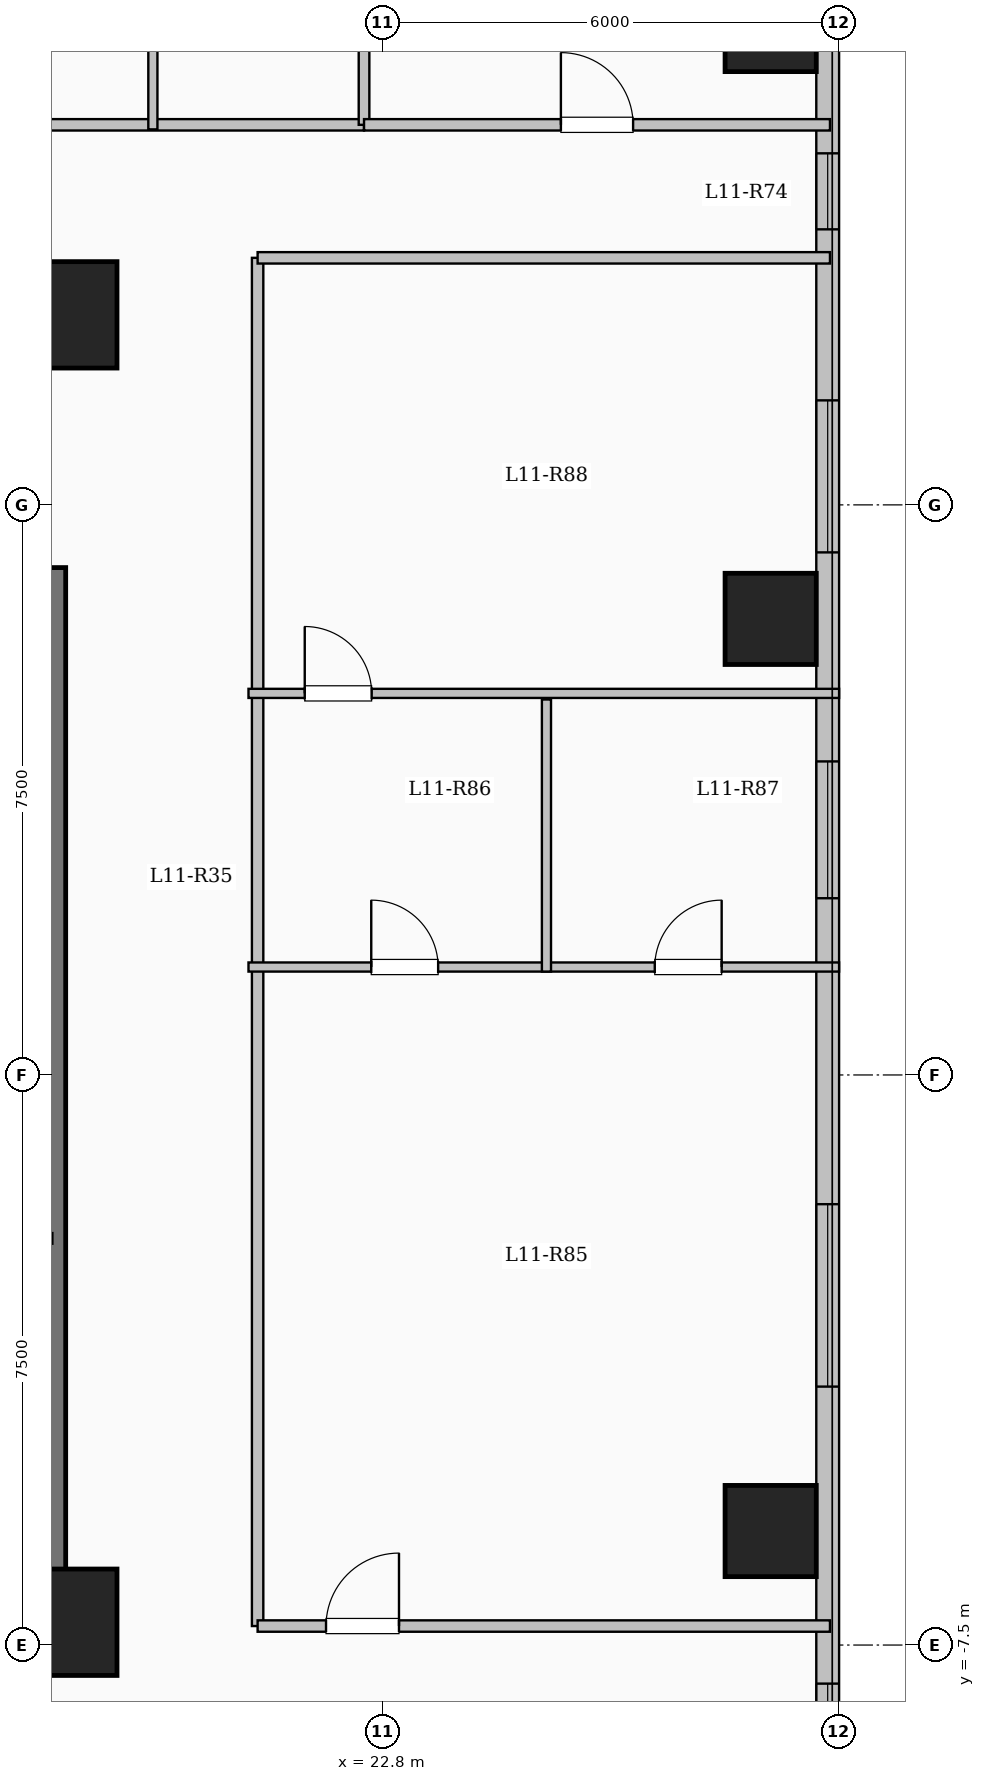
"""IFC4 building model, lengths in metres.
Left out: names, types, materials, properties, quantities, classifications, styles, units other than length and angle.
Written with IfcOpenShell. Run it as: python <this file> out.ifc"""

import sys

from ifc_helpers import new_model, si_unit, direction, frame, frame_2d, origin, origin_2d, place, context, subcontext, project, spatial, rectangle, extrude, element, fill, save


model = new_model("IFC4")
c1 = context("Model", 3, precision=1e-05, world=origin(), true_north=direction((0.0, 1.0)))
c2 = subcontext(c1, "Body", "Model", "MODEL_VIEW")
j1 = project(units=[si_unit("LENGTHUNIT", "METRE"), si_unit("PLANEANGLEUNIT", "RADIAN")], contexts=[c1])
p1 = place(None, origin())
s1 = spatial("IfcSite", under=j1, at=p1, CompositionType="ELEMENT")
p2 = place(p1, origin())
s2 = spatial("IfcBuilding", under=s1, at=p2, CompositionType="ELEMENT")
p3 = place(p2, frame((0.0, 0.0, 44.1)))
s3 = spatial("IfcBuildingStorey", under=s2, at=p3, CompositionType="ELEMENT", Elevation=44.1)
for number, where, z_axis, x_axis in (
    (1, (18.6, -7.2, 0.0), (0.0, 0.0, 1.0), (1.0, 0.0, 0.0)),
    (2, (18.6, 10.0, 0.0), (0.0, 0.0, 1.0), (1.0, 0.0, 0.0)),
):
    element("IfcColumn", number, at=place(p3, frame(where, z_axis=z_axis, x_axis=x_axis)), inside=s3, PredefinedType="COLUMN", context=c2, shape_type="SweptSolid", body=[
        extrude(rectangle(XDim=1.4, YDim=1.4, at=origin_2d()), origin(), (0.0, 0.0, 1.0), 3.35),
    ])
for number, where, z_axis, x_axis in (
    (3, (27.9, -6.0, 0.0), (0.0, 0.0, 1.0), (1.0, 0.0, 0.0)),
    (4, (27.9, 6.0, 0.0), (0.0, 0.0, 1.0), (1.0, 0.0, 0.0)),
    (5, (27.9, 13.8, 0.0), (0.0, 0.0, 1.0), (1.0, 0.0, 0.0)),
):
    element("IfcColumn", number, at=place(p3, frame(where, z_axis=z_axis, x_axis=x_axis)), inside=s3, PredefinedType="COLUMN", context=c2, shape_type="SweptSolid", body=[
        extrude(rectangle(XDim=1.2, YDim=1.2, at=origin_2d()), origin(), (0.0, 0.0, 1.0), 3.35),
    ])
p4 = place(p3, frame((28.65, 19.05, 0.0), z_axis=(0.0, 0.0, 1.0), x_axis=(0.0, -1.0, 0.0)))
e6 = element("IfcWall", 6, at=p4, inside=s3, PredefinedType="SOLIDWALL", context=c2, shape_type="SweptSolid", body=[
    extrude(rectangle(XDim=38.1, YDim=0.3, at=frame_2d((19.05, 0.0))), origin(), (0.0, 0.0, 1.0), 3.1),
])
p5 = place(p4, frame((2.275, 0.0, 0.9)))
e7 = element("IfcOpeningElement", 7, at=p5, cuts=e6, PredefinedType="OPENING", context=c2, shape_type="SweptSolid", body=[
    extrude(rectangle(XDim=2.0, YDim=1.7, at=frame_2d((1.0, 0.85))), frame((0.0, 0.16, 0.0), z_axis=(0.0, -1.0, 0.0), x_axis=(1.0, 0.0, 0.0)), (0.0, 0.0, 1.0), 0.32),
])
p6 = place(p4, frame((6.925, 0.0, 0.95)))
e8 = element("IfcOpeningElement", 8, at=p6, cuts=e6, PredefinedType="OPENING", context=c2, shape_type="SweptSolid", body=[
    extrude(rectangle(XDim=1.0, YDim=1.5, at=frame_2d((0.5, 0.75))), frame((0.0, 0.16, 0.0), z_axis=(0.0, -1.0, 0.0), x_axis=(1.0, 0.0, 0.0)), (0.0, 0.0, 1.0), 0.32),
])
p7 = place(p4, frame((10.175, 0.0, 0.9)))
e9 = element("IfcOpeningElement", 9, at=p7, cuts=e6, PredefinedType="OPENING", context=c2, shape_type="SweptSolid", body=[
    extrude(rectangle(XDim=2.0, YDim=1.7, at=frame_2d((1.0, 0.85))), frame((0.0, 0.16, 0.0), z_axis=(0.0, -1.0, 0.0), x_axis=(1.0, 0.0, 0.0)), (0.0, 0.0, 1.0), 0.32),
])
p8 = place(p4, frame((14.925, 0.0, 0.9)))
e10 = element("IfcOpeningElement", 10, at=p8, cuts=e6, PredefinedType="OPENING", context=c2, shape_type="SweptSolid", body=[
    extrude(rectangle(XDim=1.8, YDim=1.65, at=frame_2d((0.9, 0.825))), frame((0.0, 0.16, 0.0), z_axis=(0.0, -1.0, 0.0), x_axis=(1.0, 0.0, 0.0)), (0.0, 0.0, 1.0), 0.32),
])
p9 = place(p4, frame((20.75, 0.0, 0.9)))
e11 = element("IfcOpeningElement", 11, at=p9, cuts=e6, PredefinedType="OPENING", context=c2, shape_type="SweptSolid", body=[
    extrude(rectangle(XDim=2.4, YDim=1.8, at=frame_2d((1.2, 0.9))), frame((0.0, 0.16, 0.0), z_axis=(0.0, -1.0, 0.0), x_axis=(1.0, 0.0, 0.0)), (0.0, 0.0, 1.0), 0.32),
])
p10 = place(p4, frame((27.058, 0.0, 0.9)))
e12 = element("IfcOpeningElement", 12, at=p10, cuts=e6, PredefinedType="OPENING", context=c2, shape_type="SweptSolid", body=[
    extrude(rectangle(XDim=1.5, YDim=1.65, at=frame_2d((0.75, 0.825))), frame((0.0, 0.16, 0.0), z_axis=(0.0, -1.0, 0.0), x_axis=(1.0, 0.0, 0.0)), (0.0, 0.0, 1.0), 0.32),
])
p11 = place(p4, frame((32.55, 0.0, 0.9)))
e13 = element("IfcOpeningElement", 13, at=p11, cuts=e6, PredefinedType="OPENING", context=c2, shape_type="SweptSolid", body=[
    extrude(rectangle(XDim=2.4, YDim=1.8, at=frame_2d((1.2, 0.9))), frame((0.0, 0.16, 0.0), z_axis=(0.0, -1.0, 0.0), x_axis=(1.0, 0.0, 0.0)), (0.0, 0.0, 1.0), 0.32),
])
p12 = place(p3, frame((18.45, -7.375, 0.0), z_axis=(0.0, 0.0, 1.0), x_axis=(0.0, 1.0, 0.0)))
e14 = element("IfcWall", 14, at=p12, inside=s3, PredefinedType="SHEAR", context=c2, shape_type="SweptSolid", body=[
    extrude(rectangle(XDim=14.05, YDim=0.35, at=frame_2d((7.025, 0.0))), origin(), (0.0, 0.0, 1.0), 3.35),
])
p13 = place(p3, frame((10.075, -7.2, 0.0), z_axis=(0.0, 0.0, 1.0), x_axis=(1.0, 0.0, 0.0)))
e15 = element("IfcWall", 15, at=p13, inside=s3, PredefinedType="SHEAR", context=c2, shape_type="SweptSolid", body=[
    extrude(rectangle(XDim=8.55, YDim=0.35, at=frame_2d((4.275, 0.0))), origin(), (0.0, 0.0, 1.0), 3.35),
])
p14 = place(p3, frame((3.85, 12.5, 0.0), z_axis=(0.0, 0.0, 1.0), x_axis=(1.0, 0.0, 0.0)))
e16 = element("IfcWall", 16, at=p14, inside=s3, PredefinedType="PARTITIONING", context=c2, shape_type="SweptSolid", body=[
    extrude(rectangle(XDim=18.7, YDim=0.15, at=frame_2d((9.35, 0.0))), origin(), (0.0, 0.0, 1.0), 3.1),
])
p15 = place(p14, frame((1.6, 0.0, 0.0)))
e17 = element("IfcOpeningElement", 17, at=p15, cuts=e16, PredefinedType="OPENING", context=c2, shape_type="SweptSolid", body=[
    extrude(rectangle(XDim=0.96, YDim=2.15, at=frame_2d((0.48, 1.075))), frame((0.0, 0.085, 0.0), z_axis=(0.0, -1.0, 0.0), x_axis=(1.0, 0.0, 0.0)), (0.0, 0.0, 1.0), 0.17),
])
p16 = place(p14, frame((6.64, 0.0, 0.0)))
e18 = element("IfcOpeningElement", 18, at=p16, cuts=e16, PredefinedType="OPENING", context=c2, shape_type="SweptSolid", body=[
    extrude(rectangle(XDim=0.96, YDim=2.15, at=frame_2d((0.48, 1.075))), frame((0.0, 0.085, 0.0), z_axis=(0.0, -1.0, 0.0), x_axis=(1.0, 0.0, 0.0)), (0.0, 0.0, 1.0), 0.17),
])
p17 = place(p3, frame((21.15, -7.25, 0.0), z_axis=(0.0, 0.0, 1.0), x_axis=(0.0, 1.0, 0.0)))
e19 = element("IfcWall", 19, at=p17, inside=s3, PredefinedType="PARTITIONING", context=c2, shape_type="SweptSolid", body=[
    extrude(rectangle(XDim=18.0, YDim=0.15, at=frame_2d((9.0, 0.0))), origin(), (0.0, 0.0, 1.0), 2.585),
])
p18 = place(p3, frame((19.772, 12.44, 0.0), z_axis=(0.0, 0.0, 1.0), x_axis=(0.0, 1.0, 0.0)))
e20 = element("IfcWall", 20, at=p18, inside=s3, PredefinedType="PARTITIONING", context=c2, shape_type="SweptSolid", body=[
    extrude(rectangle(XDim=2.79, YDim=0.12, at=frame_2d((1.395, 0.0))), origin(), (0.0, 0.0, 1.0), 3.1),
])
p19 = place(p3, frame((21.15, -7.25, 0.0), z_axis=(0.0, 0.0, 1.0), x_axis=(1.0, 0.0, 0.0)))
e21 = element("IfcWall", 21, at=p19, inside=s3, PredefinedType="PARTITIONING", context=c2, shape_type="SweptSolid", body=[
    extrude(rectangle(XDim=7.53, YDim=0.15, at=frame_2d((3.765, 0.0))), origin(), (0.0, 0.0, 1.0), 3.1),
])
p20 = place(p19, frame((0.9, 0.0, 0.0)))
e22 = element("IfcOpeningElement", 22, at=p20, cuts=e21, PredefinedType="OPENING", context=c2, shape_type="SweptSolid", body=[
    extrude(rectangle(XDim=0.96, YDim=2.15, at=frame_2d((0.48, 1.075))), frame((0.0, 0.085, 0.0), z_axis=(0.0, -1.0, 0.0), x_axis=(1.0, 0.0, 0.0)), (0.0, 0.0, 1.0), 0.17),
])
p21 = place(p3, frame((21.15, 10.75, 0.0), z_axis=(0.0, 0.0, 1.0), x_axis=(1.0, 0.0, 0.0)))
e23 = element("IfcWall", 23, at=p21, inside=s3, PredefinedType="PARTITIONING", context=c2, shape_type="SweptSolid", body=[
    extrude(rectangle(XDim=7.53, YDim=0.15, at=frame_2d((3.765, 0.0))), origin(), (0.0, 0.0, 1.0), 3.1),
])
p22 = place(p3, frame((22.55, 12.5, 0.0), z_axis=(0.0, 0.0, 1.0), x_axis=(0.0, 1.0, 0.0)))
e24 = element("IfcWall", 24, at=p22, inside=s3, PredefinedType="PARTITIONING", context=c2, shape_type="SweptSolid", body=[
    extrude(rectangle(XDim=6.55, YDim=0.14, at=frame_2d((3.275, 0.0))), origin(), (0.0, 0.0, 1.0), 3.1),
])
p23 = place(p3, frame((22.55, 12.5, 0.0), z_axis=(0.0, 0.0, 1.0), x_axis=(1.0, 0.0, 0.0)))
e25 = element("IfcWall", 25, at=p23, inside=s3, PredefinedType="PARTITIONING", context=c2, shape_type="SweptSolid", body=[
    extrude(rectangle(XDim=6.13, YDim=0.15, at=frame_2d((3.065, 0.0))), origin(), (0.0, 0.0, 1.0), 3.1),
])
p24 = place(p23, frame((2.59, 0.0, 0.0)))
e26 = element("IfcOpeningElement", 26, at=p24, cuts=e25, PredefinedType="OPENING", context=c2, shape_type="SweptSolid", body=[
    extrude(rectangle(XDim=0.95, YDim=2.15, at=frame_2d((0.475, 1.075))), frame((0.0, 0.085, 0.0), z_axis=(0.0, -1.0, 0.0), x_axis=(1.0, 0.0, 0.0)), (0.0, 0.0, 1.0), 0.17),
])
p25 = place(p3, frame((21.03, 1.42, 0.0), z_axis=(0.0, 0.0, 1.0), x_axis=(1.0, 0.0, 0.0)))
e27 = element("IfcWall", 27, at=p25, inside=s3, PredefinedType="PARTITIONING", context=c2, shape_type="SweptSolid", body=[
    extrude(rectangle(XDim=7.77, YDim=0.12, at=frame_2d((3.885, 0.0))), origin(), (0.0, 0.0, 1.0), 3.1),
])
p26 = place(p25, frame((1.615, 0.0, 0.0)))
e28 = element("IfcOpeningElement", 28, at=p26, cuts=e27, PredefinedType="OPENING", context=c2, shape_type="SweptSolid", body=[
    extrude(rectangle(XDim=0.88, YDim=2.1, at=frame_2d((0.44, 1.05))), frame((0.0, 0.07, 0.0), z_axis=(0.0, -1.0, 0.0), x_axis=(1.0, 0.0, 0.0)), (0.0, 0.0, 1.0), 0.14),
])
p27 = place(p25, frame((5.345, 0.0, 0.0)))
e29 = element("IfcOpeningElement", 29, at=p27, cuts=e27, PredefinedType="OPENING", context=c2, shape_type="SweptSolid", body=[
    extrude(rectangle(XDim=0.88, YDim=2.1, at=frame_2d((0.44, 1.05))), frame((0.0, 0.07, 0.0), z_axis=(0.0, -1.0, 0.0), x_axis=(1.0, 0.0, 0.0)), (0.0, 0.0, 1.0), 0.14),
])
p28 = place(p3, frame((21.03, 5.02, 0.0), z_axis=(0.0, 0.0, 1.0), x_axis=(1.0, 0.0, 0.0)))
e30 = element("IfcWall", 30, at=p28, inside=s3, PredefinedType="PARTITIONING", context=c2, shape_type="SweptSolid", body=[
    extrude(rectangle(XDim=7.77, YDim=0.12, at=frame_2d((3.885, 0.0))), origin(), (0.0, 0.0, 1.0), 3.1),
])
p29 = place(p28, frame((0.74, 0.0, 0.0)))
e31 = element("IfcOpeningElement", 31, at=p29, cuts=e30, PredefinedType="OPENING", context=c2, shape_type="SweptSolid", body=[
    extrude(rectangle(XDim=0.88, YDim=2.1, at=frame_2d((0.44, 1.05))), frame((0.0, 0.07, 0.0), z_axis=(0.0, -1.0, 0.0), x_axis=(1.0, 0.0, 0.0)), (0.0, 0.0, 1.0), 0.14),
])
p30 = place(p3, frame((24.95, 1.36, 0.0), z_axis=(0.0, 0.0, 1.0), x_axis=(0.0, 1.0, 0.0)))
e32 = element("IfcWall", 32, at=p30, inside=s3, PredefinedType="PARTITIONING", context=c2, shape_type="SweptSolid", body=[
    extrude(rectangle(XDim=3.58, YDim=0.12, at=frame_2d((1.79, 0.0))), origin(), (0.0, 0.0, 1.0), 3.1),
])
p31 = place(p6, origin())
e33 = element("IfcWindow", 33, at=p31, inside=s3, PartitioningType="SINGLE_PANEL", PredefinedType="WINDOW", context=c2, shape_type="SweptSolid", body=[
    extrude(rectangle(XDim=1.0, YDim=1.5, at=frame_2d((0.5, 0.75))), frame((0.0, 0.03, 0.0), z_axis=(0.0, -1.0, 0.0), x_axis=(1.0, 0.0, 0.0)), (0.0, 0.0, 1.0), 0.06),
])
fill(e8, e33)
p32 = place(p7, origin())
e34 = element("IfcWindow", 34, at=p32, inside=s3, PartitioningType="SINGLE_PANEL", PredefinedType="WINDOW", context=c2, shape_type="SweptSolid", body=[
    extrude(rectangle(XDim=2.0, YDim=1.7, at=frame_2d((1.0, 0.85))), frame((0.0, 0.03, 0.0), z_axis=(0.0, -1.0, 0.0), x_axis=(1.0, 0.0, 0.0)), (0.0, 0.0, 1.0), 0.06),
])
fill(e9, e34)
p33 = place(p8, origin())
e35 = element("IfcWindow", 35, at=p33, inside=s3, PartitioningType="SINGLE_PANEL", PredefinedType="WINDOW", context=c2, shape_type="SweptSolid", body=[
    extrude(rectangle(XDim=1.8, YDim=1.65, at=frame_2d((0.9, 0.825))), frame((0.0, 0.03, 0.0), z_axis=(0.0, -1.0, 0.0), x_axis=(1.0, 0.0, 0.0)), (0.0, 0.0, 1.0), 0.06),
])
fill(e10, e35)
p34 = place(p9, origin())
e36 = element("IfcWindow", 36, at=p34, inside=s3, PartitioningType="SINGLE_PANEL", PredefinedType="WINDOW", context=c2, shape_type="SweptSolid", body=[
    extrude(rectangle(XDim=2.4, YDim=1.8, at=frame_2d((1.2, 0.9))), frame((0.0, 0.03, 0.0), z_axis=(0.0, -1.0, 0.0), x_axis=(1.0, 0.0, 0.0)), (0.0, 0.0, 1.0), 0.06),
])
fill(e11, e36)
p35 = place(p10, origin())
e37 = element("IfcWindow", 37, at=p35, inside=s3, PartitioningType="SINGLE_PANEL", PredefinedType="WINDOW", context=c2, shape_type="SweptSolid", body=[
    extrude(rectangle(XDim=1.5, YDim=1.65, at=frame_2d((0.75, 0.825))), frame((0.0, 0.03, 0.0), z_axis=(0.0, -1.0, 0.0), x_axis=(1.0, 0.0, 0.0)), (0.0, 0.0, 1.0), 0.06),
])
fill(e12, e37)
p36 = place(p24, origin())
e38 = element("IfcDoor", 38, at=p36, inside=s3, OperationType="SINGLE_SWING_LEFT", PredefinedType="DOOR", context=c2, shape_type="SweptSolid", body=[
    extrude(rectangle(XDim=0.95, YDim=2.15, at=frame_2d((0.475, 1.075))), frame((0.0, 0.025, 0.0), z_axis=(0.0, -1.0, 0.0), x_axis=(1.0, 0.0, 0.0)), (0.0, 0.0, 1.0), 0.05),
])
fill(e26, e38)
p37 = place(p20, origin())
e39 = element("IfcDoor", 39, at=p37, inside=s3, OperationType="SINGLE_SWING_RIGHT", PredefinedType="DOOR", context=c2, shape_type="SweptSolid", body=[
    extrude(rectangle(XDim=0.96, YDim=2.15, at=frame_2d((0.48, 1.075))), frame((0.0, 0.025, 0.0), z_axis=(0.0, -1.0, 0.0), x_axis=(1.0, 0.0, 0.0)), (0.0, 0.0, 1.0), 0.05),
])
fill(e22, e39)
p38 = place(p26, origin())
e40 = element("IfcDoor", 40, at=p38, inside=s3, OperationType="SINGLE_SWING_LEFT", PredefinedType="DOOR", context=c2, shape_type="SweptSolid", body=[
    extrude(rectangle(XDim=0.88, YDim=2.1, at=frame_2d((0.44, 1.05))), frame((0.0, 0.025, 0.0), z_axis=(0.0, -1.0, 0.0), x_axis=(1.0, 0.0, 0.0)), (0.0, 0.0, 1.0), 0.05),
])
fill(e28, e40)
p39 = place(p27, origin())
e41 = element("IfcDoor", 41, at=p39, inside=s3, OperationType="SINGLE_SWING_RIGHT", PredefinedType="DOOR", context=c2, shape_type="SweptSolid", body=[
    extrude(rectangle(XDim=0.88, YDim=2.1, at=frame_2d((0.44, 1.05))), frame((0.0, 0.025, 0.0), z_axis=(0.0, -1.0, 0.0), x_axis=(1.0, 0.0, 0.0)), (0.0, 0.0, 1.0), 0.05),
])
fill(e29, e41)
p40 = place(p29, origin())
e42 = element("IfcDoor", 42, at=p40, inside=s3, OperationType="SINGLE_SWING_LEFT", PredefinedType="DOOR", context=c2, shape_type="SweptSolid", body=[
    extrude(rectangle(XDim=0.88, YDim=2.1, at=frame_2d((0.44, 1.05))), frame((0.0, 0.025, 0.0), z_axis=(0.0, -1.0, 0.0), x_axis=(1.0, 0.0, 0.0)), (0.0, 0.0, 1.0), 0.05),
])
fill(e31, e42)
save(model, sys.argv[1])
